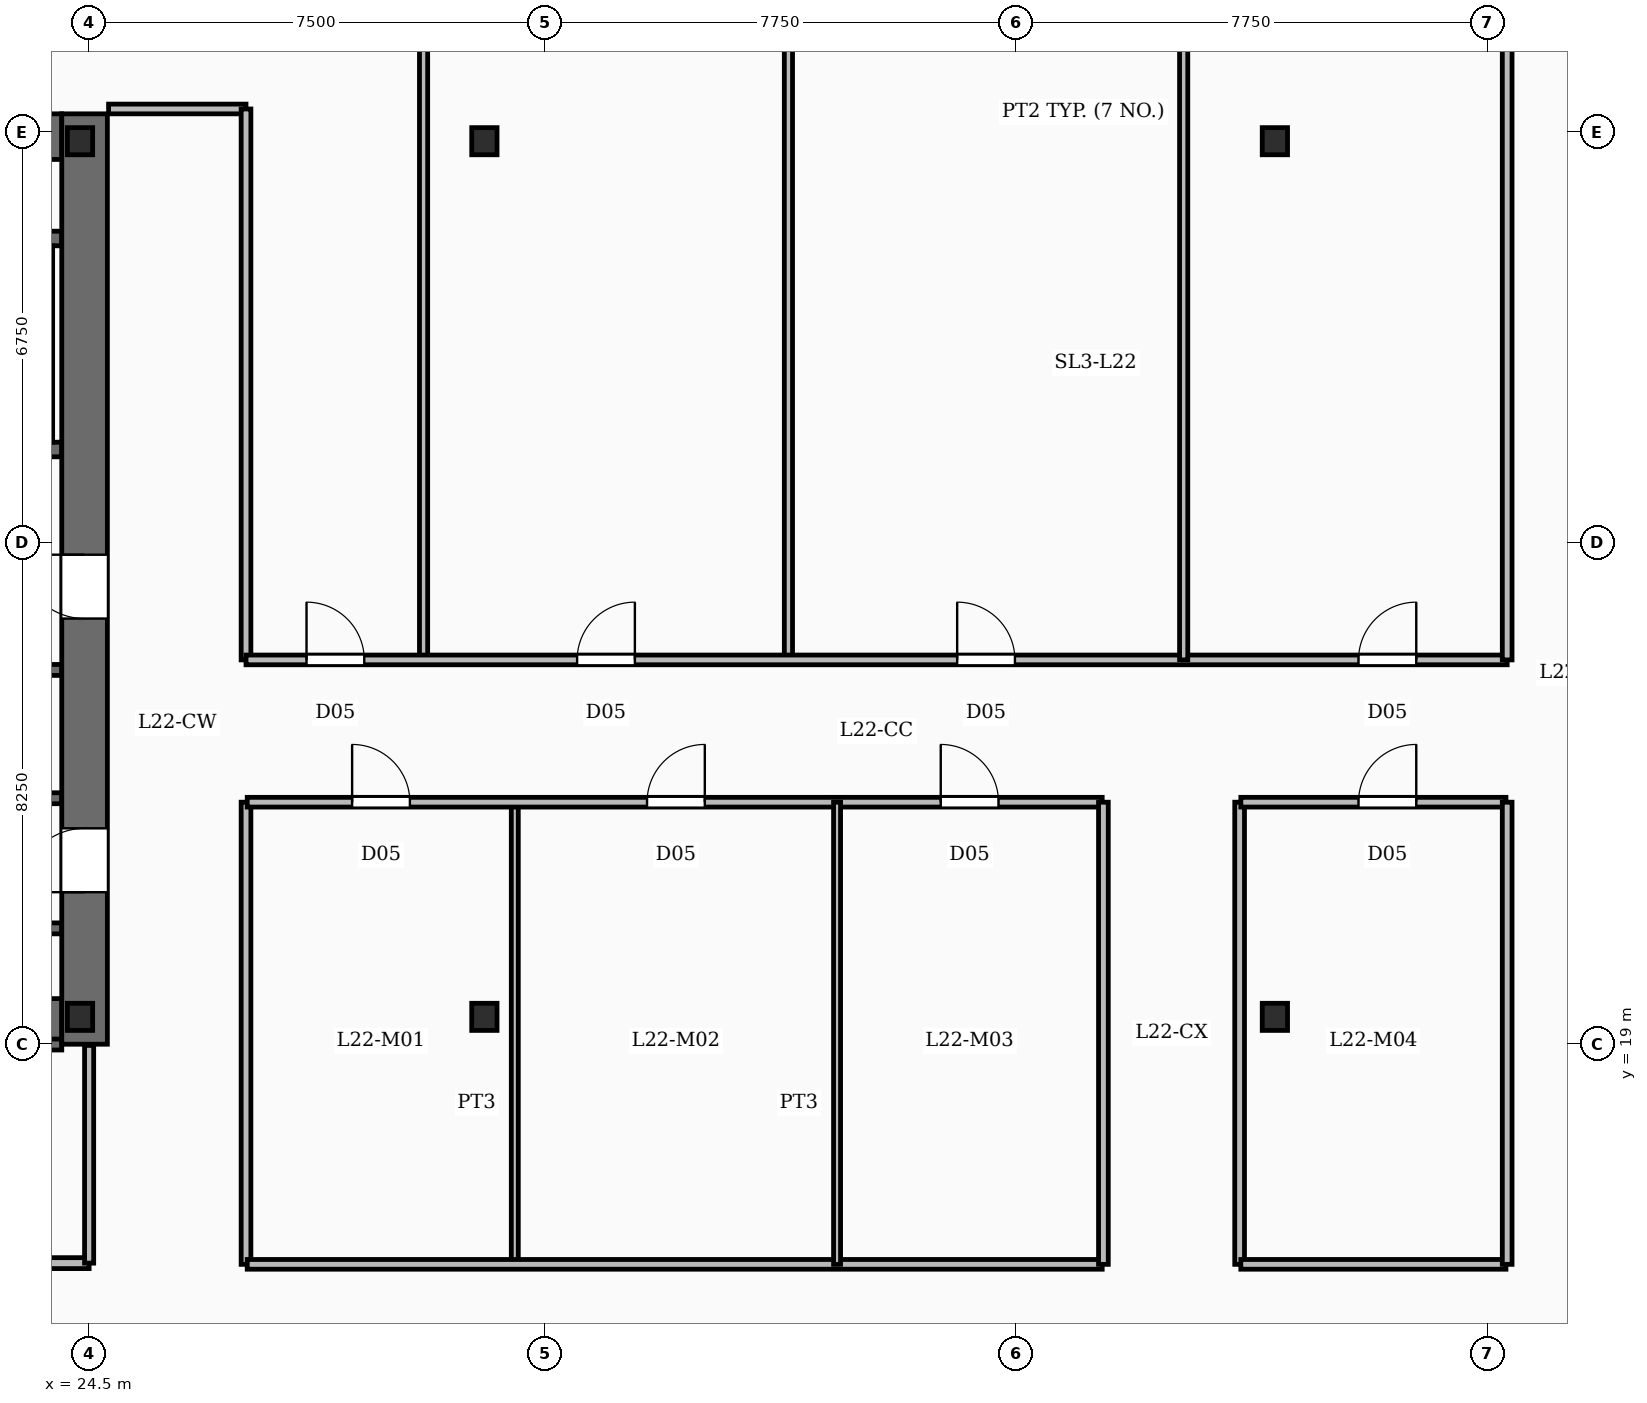
"""IFC4 building model, lengths in metres.
Left out: names, types, materials, properties, quantities, classifications, styles, units other than length and angle.
Written with IfcOpenShell. Run it as: python <this file> out.ifc"""

import sys

from ifc_helpers import new_model, si_unit, direction, frame, frame_2d, origin, origin_2d, place, context, subcontext, project, spatial, rectangle, i_section, extrude, element, fill, save


model = new_model("IFC4")
c1 = context("Model", 3, precision=1e-05, world=origin(), true_north=direction((0.0, 1.0)))
c2 = subcontext(c1, "Body", "Model", "MODEL_VIEW")
j1 = project(units=[si_unit("LENGTHUNIT", "METRE"), si_unit("PLANEANGLEUNIT", "RADIAN")], contexts=[c1])
p1 = place(None, origin())
s1 = spatial("IfcSite", under=j1, at=p1, CompositionType="ELEMENT")
p2 = place(p1, origin())
s2 = spatial("IfcBuilding", under=s1, at=p2, CompositionType="ELEMENT")
p3 = place(p2, frame((0.0, 0.0, 99.7)))
s3 = spatial("IfcBuildingStorey", under=s2, at=p3, CompositionType="ELEMENT", Elevation=99.7)
p4 = place(p3, frame((24.425, 19.0, -0.45), z_axis=(0.0, 0.0, 1.0), x_axis=(0.0, 1.0, 0.0)))
e1 = element("IfcWall", 1, at=p4, inside=s3, PredefinedType="SHEAR", context=c2, shape_type="SweptSolid", body=[
    extrude(rectangle(XDim=15.3, YDim=0.75, at=frame_2d((7.65, 0.0))), origin(), (0.0, 0.0, 1.0), 3.93),
])
p5 = place(p4, frame((2.5, 0.0, 0.45)))
e2 = element("IfcOpeningElement", 2, at=p5, cuts=e1, PredefinedType="OPENING", context=c2, shape_type="SweptSolid", body=[
    extrude(rectangle(XDim=1.05, YDim=2.15, at=frame_2d((0.525, 1.075))), frame((0.0, 0.385, 0.0), z_axis=(0.0, -1.0, 0.0), x_axis=(1.0, 0.0, 0.0)), (0.0, 0.0, 1.0), 0.77),
])
p6 = place(p4, frame((7.0, 0.0, 0.45)))
e3 = element("IfcOpeningElement", 3, at=p6, cuts=e1, PredefinedType="OPENING", context=c2, shape_type="SweptSolid", body=[
    extrude(rectangle(XDim=1.05, YDim=2.15, at=frame_2d((0.525, 1.075))), frame((0.0, 0.385, 0.0), z_axis=(0.0, -1.0, 0.0), x_axis=(1.0, 0.0, 0.0)), (0.0, 0.0, 1.0), 0.77),
])
for number, where, z_axis, x_axis in (
    (4, (14.85, 19.375, -0.45), (0.0, 0.0, 1.0), (1.0, 0.0, 0.0)),
    (5, (14.85, 33.925, -0.45), (0.0, 0.0, 1.0), (1.0, 0.0, 0.0)),
):
    element("IfcWall", number, at=place(p3, frame(where, z_axis=z_axis, x_axis=x_axis)), inside=s3, PredefinedType="SHEAR", context=c2, shape_type="SweptSolid", body=[
        extrude(rectangle(XDim=9.2, YDim=0.75, at=frame_2d((4.6, 0.0))), origin(), (0.0, 0.0, 1.0), 3.93),
    ])
for number, where, z_axis, x_axis in (
    (6, (24.35, 19.45, -0.45), (0.0, 0.0, 1.0), (1.0, 0.0, 0.0)),
    (7, (24.35, 33.85, -0.45), (0.0, 0.0, 1.0), (1.0, 0.0, 0.0)),
    (8, (31.0, 19.45, -0.45), (0.0, 0.0, 1.0), (1.0, 0.0, 0.0)),
    (9, (44.0, 19.45, -0.45), (0.0, 0.0, 1.0), (1.0, 0.0, 0.0)),
    (10, (31.0, 33.85, -0.45), (0.0, 0.0, 1.0), (1.0, 0.0, 0.0)),
    (11, (44.0, 33.85, -0.45), (0.0, 0.0, 1.0), (1.0, 0.0, 0.0)),
):
    element("IfcColumn", number, at=place(p3, frame(where, z_axis=z_axis, x_axis=x_axis)), inside=s3, PredefinedType="COLUMN", context=c2, shape_type="SweptSolid", body=[
        extrude(i_section(OverallWidth=0.416, OverallDepth=0.446, WebThickness=0.039, FlangeThickness=0.063, FilletRadius=0.02, at=origin_2d()), origin(), (0.0, 0.0, 1.0), 3.93),
    ])
p7 = place(p3, frame((24.05, 28.78, 0.0), z_axis=(0.0, 0.0, 1.0), x_axis=(-1.0, 0.0, 0.0)))
e12 = element("IfcWall", 12, at=p7, inside=s3, PredefinedType="SOLIDWALL", context=c2, shape_type="SweptSolid", body=[
    extrude(rectangle(XDim=9.2, YDim=0.24, at=frame_2d((4.6, 0.0))), origin(), (0.0, 0.0, 1.0), 3.48),
])
p8 = place(p7, frame((7.53, 0.0, 0.0)))
e13 = element("IfcOpeningElement", 13, at=p8, cuts=e12, PredefinedType="OPENING", context=c2, shape_type="SweptSolid", body=[
    extrude(rectangle(XDim=1.1, YDim=2.15, at=frame_2d((0.55, 1.075))), frame((0.0, 0.13, 0.0), z_axis=(0.0, -1.0, 0.0), x_axis=(1.0, 0.0, 0.0)), (0.0, 0.0, 1.0), 0.26),
])
p9 = place(p3, frame((14.85, 32.25, 0.0), z_axis=(0.0, 0.0, 1.0), x_axis=(1.0, 0.0, 0.0)))
e14 = element("IfcWall", 14, at=p9, inside=s3, PredefinedType="SOLIDWALL", context=c2, shape_type="SweptSolid", body=[
    extrude(rectangle(XDim=9.2, YDim=0.24, at=frame_2d((4.6, 0.0))), origin(), (0.0, 0.0, 1.0), 3.48),
])
p10 = place(p3, frame((23.78, 28.9, 0.0), z_axis=(0.0, 0.0, 1.0), x_axis=(0.0, 1.0, 0.0)))
e15 = element("IfcWall", 15, at=p10, inside=s3, PredefinedType="SOLIDWALL", context=c2, shape_type="SweptSolid", body=[
    extrude(rectangle(XDim=3.23, YDim=0.24, at=frame_2d((1.615, 0.0))), origin(), (0.0, 0.0, 1.0), 3.48),
])
for number, where, z_axis, x_axis in (
    (16, (20.9, 20.905, 0.0), (0.0, 0.0, 1.0), (1.0, 0.0, 0.0)),
    (17, (20.9, 18.995, 0.0), (0.0, 0.0, 1.0), (1.0, 0.0, 0.0)),
):
    element("IfcWall", number, at=place(p3, frame(where, z_axis=z_axis, x_axis=x_axis)), inside=s3, PredefinedType="SOLIDWALL", context=c2, shape_type="SweptSolid", body=[
        extrude(rectangle(XDim=3.15, YDim=0.18, at=frame_2d((1.575, 0.0))), origin(), (0.0, 0.0, 1.0), 3.48),
    ])
for number, where, z_axis, x_axis in (
    (18, (20.95, 25.155, 0.0), (0.0, 0.0, 1.0), (1.0, 0.0, 0.0)),
    (19, (20.95, 23.045, 0.0), (0.0, 0.0, 1.0), (1.0, 0.0, 0.0)),
):
    element("IfcWall", number, at=place(p3, frame(where, z_axis=z_axis, x_axis=x_axis)), inside=s3, PredefinedType="SOLIDWALL", context=c2, shape_type="SweptSolid", body=[
        extrude(rectangle(XDim=3.1, YDim=0.18, at=frame_2d((1.55, 0.0))), origin(), (0.0, 0.0, 1.0), 3.48),
    ])
p11 = place(p3, frame((14.6, 15.4, 0.0), z_axis=(0.0, 0.0, 1.0), x_axis=(1.0, 0.0, 0.0)))
e20 = element("IfcWall", 20, at=p11, inside=s3, PredefinedType="PARTITIONING", context=c2, shape_type="SweptSolid", body=[
    extrude(rectangle(XDim=9.9, YDim=0.18, at=frame_2d((4.95, 0.0))), origin(), (0.0, 0.0, 1.0), 2.54),
])
p12 = place(p11, frame((1.99, 0.0, 0.0)))
e21 = element("IfcOpeningElement", 21, at=p12, cuts=e20, PredefinedType="OPENING", context=c2, shape_type="SweptSolid", body=[
    extrude(rectangle(XDim=0.92, YDim=2.1, at=frame_2d((0.46, 1.05))), frame((0.0, 0.1, 0.0), z_axis=(0.0, -1.0, 0.0), x_axis=(1.0, 0.0, 0.0)), (0.0, 0.0, 1.0), 0.2),
])
p13 = place(p11, frame((6.94, 0.0, 0.0)))
e22 = element("IfcOpeningElement", 22, at=p13, cuts=e20, PredefinedType="OPENING", context=c2, shape_type="SweptSolid", body=[
    extrude(rectangle(XDim=0.92, YDim=2.1, at=frame_2d((0.46, 1.05))), frame((0.0, 0.1, 0.0), z_axis=(0.0, -1.0, 0.0), x_axis=(1.0, 0.0, 0.0)), (0.0, 0.0, 1.0), 0.2),
])
p14 = place(p3, frame((24.5, 15.4, 0.0), z_axis=(0.0, 0.0, 1.0), x_axis=(0.0, 1.0, 0.0)))
e23 = element("IfcWall", 23, at=p14, inside=s3, PredefinedType="PARTITIONING", context=c2, shape_type="SweptSolid", body=[
    extrude(rectangle(XDim=3.58, YDim=0.15, at=frame_2d((1.79, 0.0))), origin(), (0.0, 0.0, 1.0), 2.54),
])
p15 = place(p3, frame((30.0, 25.32, 0.0), z_axis=(0.0, 0.0, 1.0), x_axis=(0.0, 1.0, 0.0)))
e24 = element("IfcWall", 24, at=p15, inside=s3, PredefinedType="PARTITIONING", context=c2, shape_type="SweptSolid", body=[
    extrude(rectangle(XDim=26.867, YDim=0.135, at=frame_2d((13.434, 0.0))), origin(), (0.0, 0.0, 1.0), 2.54),
])
p16 = place(p3, frame((36.0, 25.32, 0.0), z_axis=(0.0, 0.0, 1.0), x_axis=(0.0, 1.0, 0.0)))
e25 = element("IfcWall", 25, at=p16, inside=s3, PredefinedType="PARTITIONING", context=c2, shape_type="SweptSolid", body=[
    extrude(rectangle(XDim=27.498, YDim=0.135, at=frame_2d((13.749, 0.0))), origin(), (0.0, 0.0, 1.0), 2.54),
])
p17 = place(p3, frame((42.5, 25.32, 0.0), z_axis=(0.0, 0.0, 1.0), x_axis=(0.0, 1.0, 0.0)))
e26 = element("IfcWall", 26, at=p17, inside=s3, PredefinedType="PARTITIONING", context=c2, shape_type="SweptSolid", body=[
    extrude(rectangle(XDim=28.181, YDim=0.135, at=frame_2d((14.09, 0.0))), origin(), (0.0, 0.0, 1.0), 2.54),
])
p18 = place(p3, frame((27.08, 25.32, 0.0), z_axis=(0.0, 0.0, 1.0), x_axis=(1.0, 0.0, 0.0)))
e27 = element("IfcWall", 27, at=p18, inside=s3, PredefinedType="PARTITIONING", context=c2, shape_type="SweptSolid", body=[
    extrude(rectangle(XDim=20.74, YDim=0.16, at=frame_2d((10.37, 0.0))), origin(), (0.0, 0.0, 1.0), 2.54),
])
p19 = place(p18, frame((0.995, 0.0, 0.0)))
e28 = element("IfcOpeningElement", 28, at=p19, cuts=e27, PredefinedType="OPENING", context=c2, shape_type="SweptSolid", body=[
    extrude(rectangle(XDim=0.95, YDim=2.15, at=frame_2d((0.475, 1.075))), frame((0.0, 0.09, 0.0), z_axis=(0.0, -1.0, 0.0), x_axis=(1.0, 0.0, 0.0)), (0.0, 0.0, 1.0), 0.18),
])
p20 = place(p18, frame((5.445, 0.0, 0.0)))
e29 = element("IfcOpeningElement", 29, at=p20, cuts=e27, PredefinedType="OPENING", context=c2, shape_type="SweptSolid", body=[
    extrude(rectangle(XDim=0.95, YDim=2.15, at=frame_2d((0.475, 1.075))), frame((0.0, 0.09, 0.0), z_axis=(0.0, -1.0, 0.0), x_axis=(1.0, 0.0, 0.0)), (0.0, 0.0, 1.0), 0.18),
])
p21 = place(p18, frame((11.695, 0.0, 0.0)))
e30 = element("IfcOpeningElement", 30, at=p21, cuts=e27, PredefinedType="OPENING", context=c2, shape_type="SweptSolid", body=[
    extrude(rectangle(XDim=0.95, YDim=2.15, at=frame_2d((0.475, 1.075))), frame((0.0, 0.09, 0.0), z_axis=(0.0, -1.0, 0.0), x_axis=(1.0, 0.0, 0.0)), (0.0, 0.0, 1.0), 0.18),
])
p22 = place(p18, frame((18.295, 0.0, 0.0)))
e31 = element("IfcOpeningElement", 31, at=p22, cuts=e27, PredefinedType="OPENING", context=c2, shape_type="SweptSolid", body=[
    extrude(rectangle(XDim=0.95, YDim=2.15, at=frame_2d((0.475, 1.075))), frame((0.0, 0.09, 0.0), z_axis=(0.0, -1.0, 0.0), x_axis=(1.0, 0.0, 0.0)), (0.0, 0.0, 1.0), 0.18),
])
p23 = place(p3, frame((27.08, 25.32, 0.0), z_axis=(0.0, 0.0, 1.0), x_axis=(0.0, 1.0, 0.0)))
e32 = element("IfcWall", 32, at=p23, inside=s3, PredefinedType="PARTITIONING", context=c2, shape_type="SweptSolid", body=[
    extrude(rectangle(XDim=9.06, YDim=0.16, at=frame_2d((4.53, 0.0))), origin(), (0.0, 0.0, 1.0), 2.54),
])
p24 = place(p3, frame((24.82, 34.38, 0.0), z_axis=(0.0, 0.0, 1.0), x_axis=(1.0, 0.0, 0.0)))
e33 = element("IfcWall", 33, at=p24, inside=s3, PredefinedType="PARTITIONING", context=c2, shape_type="SweptSolid", body=[
    extrude(rectangle(XDim=2.26, YDim=0.16, at=frame_2d((1.13, 0.0))), origin(), (0.0, 0.0, 1.0), 2.54),
])
for number, where, z_axis, x_axis in (
    (34, (31.5, 15.38, 0.0), (0.0, 0.0, 1.0), (0.0, 1.0, 0.0)),
    (35, (36.8, 15.38, 0.0), (0.0, 0.0, 1.0), (0.0, 1.0, 0.0)),
):
    element("IfcWall", number, at=place(p3, frame(where, z_axis=z_axis, x_axis=x_axis)), inside=s3, PredefinedType="PARTITIONING", context=c2, shape_type="SweptSolid", body=[
        extrude(rectangle(XDim=7.6, YDim=0.115, at=frame_2d((3.8, 0.0))), origin(), (0.0, 0.0, 1.0), 2.54),
    ])
p25 = place(p3, frame((27.1, 22.98, 0.0), z_axis=(0.0, 0.0, 1.0), x_axis=(1.0, 0.0, 0.0)))
e36 = element("IfcWall", 36, at=p25, inside=s3, PredefinedType="PARTITIONING", context=c2, shape_type="SweptSolid", body=[
    extrude(rectangle(XDim=14.06, YDim=0.16, at=frame_2d((7.03, 0.0))), origin(), (0.0, 0.0, 1.0), 2.54),
])
p26 = place(p25, frame((1.725, 0.0, 0.0)))
e37 = element("IfcOpeningElement", 37, at=p26, cuts=e36, PredefinedType="OPENING", context=c2, shape_type="SweptSolid", body=[
    extrude(rectangle(XDim=0.95, YDim=2.15, at=frame_2d((0.475, 1.075))), frame((0.0, 0.09, 0.0), z_axis=(0.0, -1.0, 0.0), x_axis=(1.0, 0.0, 0.0)), (0.0, 0.0, 1.0), 0.18),
])
p27 = place(p25, frame((6.575, 0.0, 0.0)))
e38 = element("IfcOpeningElement", 38, at=p27, cuts=e36, PredefinedType="OPENING", context=c2, shape_type="SweptSolid", body=[
    extrude(rectangle(XDim=0.95, YDim=2.15, at=frame_2d((0.475, 1.075))), frame((0.0, 0.09, 0.0), z_axis=(0.0, -1.0, 0.0), x_axis=(1.0, 0.0, 0.0)), (0.0, 0.0, 1.0), 0.18),
])
p28 = place(p25, frame((11.405, 0.0, 0.0)))
e39 = element("IfcOpeningElement", 39, at=p28, cuts=e36, PredefinedType="OPENING", context=c2, shape_type="SweptSolid", body=[
    extrude(rectangle(XDim=0.95, YDim=2.15, at=frame_2d((0.475, 1.075))), frame((0.0, 0.09, 0.0), z_axis=(0.0, -1.0, 0.0), x_axis=(1.0, 0.0, 0.0)), (0.0, 0.0, 1.0), 0.18),
])
p29 = place(p3, frame((27.1, 15.38, 0.0), z_axis=(0.0, 0.0, 1.0), x_axis=(1.0, 0.0, 0.0)))
e40 = element("IfcWall", 40, at=p29, inside=s3, PredefinedType="PARTITIONING", context=c2, shape_type="SweptSolid", body=[
    extrude(rectangle(XDim=14.06, YDim=0.16, at=frame_2d((7.03, 0.0))), origin(), (0.0, 0.0, 1.0), 2.54),
])
p30 = place(p3, frame((43.44, 22.98, 0.0), z_axis=(0.0, 0.0, 1.0), x_axis=(1.0, 0.0, 0.0)))
e41 = element("IfcWall", 41, at=p30, inside=s3, PredefinedType="PARTITIONING", context=c2, shape_type="SweptSolid", body=[
    extrude(rectangle(XDim=4.36, YDim=0.16, at=frame_2d((2.18, 0.0))), origin(), (0.0, 0.0, 1.0), 2.54),
])
p31 = place(p30, frame((1.935, 0.0, 0.0)))
e42 = element("IfcOpeningElement", 42, at=p31, cuts=e41, PredefinedType="OPENING", context=c2, shape_type="SweptSolid", body=[
    extrude(rectangle(XDim=0.95, YDim=2.15, at=frame_2d((0.475, 1.075))), frame((0.0, 0.09, 0.0), z_axis=(0.0, -1.0, 0.0), x_axis=(1.0, 0.0, 0.0)), (0.0, 0.0, 1.0), 0.18),
])
p32 = place(p3, frame((43.44, 15.38, 0.0), z_axis=(0.0, 0.0, 1.0), x_axis=(1.0, 0.0, 0.0)))
e43 = element("IfcWall", 43, at=p32, inside=s3, PredefinedType="PARTITIONING", context=c2, shape_type="SweptSolid", body=[
    extrude(rectangle(XDim=4.36, YDim=0.16, at=frame_2d((2.18, 0.0))), origin(), (0.0, 0.0, 1.0), 2.54),
])
for number, where, z_axis, x_axis in (
    (44, (41.18, 15.38, 0.0), (0.0, 0.0, 1.0), (0.0, 1.0, 0.0)),
    (45, (43.42, 15.38, 0.0), (0.0, 0.0, 1.0), (0.0, 1.0, 0.0)),
    (46, (27.08, 15.38, 0.0), (0.0, 0.0, 1.0), (0.0, 1.0, 0.0)),
    (47, (47.82, 15.38, 0.0), (0.0, 0.0, 1.0), (0.0, 1.0, 0.0)),
):
    element("IfcWall", number, at=place(p3, frame(where, z_axis=z_axis, x_axis=x_axis)), inside=s3, PredefinedType="PARTITIONING", context=c2, shape_type="SweptSolid", body=[
        extrude(rectangle(XDim=7.6, YDim=0.16, at=frame_2d((3.8, 0.0))), origin(), (0.0, 0.0, 1.0), 2.54),
    ])
p33 = place(p3, frame((47.82, 25.32, 0.0), z_axis=(0.0, 0.0, 1.0), x_axis=(0.0, 1.0, 0.0)))
e48 = element("IfcWall", 48, at=p33, inside=s3, PredefinedType="PARTITIONING", context=c2, shape_type="SweptSolid", body=[
    extrude(rectangle(XDim=10.88, YDim=0.16, at=frame_2d((5.44, 0.0))), origin(), (0.0, 0.0, 1.0), 2.54),
])
p34 = place(p5, origin())
e49 = element("IfcDoor", 49, at=p34, inside=s3, OperationType="SINGLE_SWING_LEFT", PredefinedType="DOOR", context=c2, shape_type="SweptSolid", body=[
    extrude(rectangle(XDim=1.05, YDim=2.15, at=frame_2d((0.525, 1.075))), frame((0.0, 0.025, 0.0), z_axis=(0.0, -1.0, 0.0), x_axis=(1.0, 0.0, 0.0)), (0.0, 0.0, 1.0), 0.05),
])
fill(e2, e49)
p35 = place(p6, origin())
e50 = element("IfcDoor", 50, at=p35, inside=s3, OperationType="SINGLE_SWING_RIGHT", PredefinedType="DOOR", context=c2, shape_type="SweptSolid", body=[
    extrude(rectangle(XDim=1.05, YDim=2.15, at=frame_2d((0.525, 1.075))), frame((0.0, 0.025, 0.0), z_axis=(0.0, -1.0, 0.0), x_axis=(1.0, 0.0, 0.0)), (0.0, 0.0, 1.0), 0.05),
])
fill(e3, e50)
p36 = place(p19, origin())
e51 = element("IfcDoor", 51, at=p36, inside=s3, OperationType="SINGLE_SWING_LEFT", PredefinedType="DOOR", context=c2, shape_type="SweptSolid", body=[
    extrude(rectangle(XDim=0.95, YDim=2.15, at=frame_2d((0.475, 1.075))), frame((0.0, 0.025, 0.0), z_axis=(0.0, -1.0, 0.0), x_axis=(1.0, 0.0, 0.0)), (0.0, 0.0, 1.0), 0.05),
])
fill(e28, e51)
p37 = place(p20, origin())
e52 = element("IfcDoor", 52, at=p37, inside=s3, OperationType="SINGLE_SWING_RIGHT", PredefinedType="DOOR", context=c2, shape_type="SweptSolid", body=[
    extrude(rectangle(XDim=0.95, YDim=2.15, at=frame_2d((0.475, 1.075))), frame((0.0, 0.025, 0.0), z_axis=(0.0, -1.0, 0.0), x_axis=(1.0, 0.0, 0.0)), (0.0, 0.0, 1.0), 0.05),
])
fill(e29, e52)
p38 = place(p21, origin())
e53 = element("IfcDoor", 53, at=p38, inside=s3, OperationType="SINGLE_SWING_LEFT", PredefinedType="DOOR", context=c2, shape_type="SweptSolid", body=[
    extrude(rectangle(XDim=0.95, YDim=2.15, at=frame_2d((0.475, 1.075))), frame((0.0, 0.025, 0.0), z_axis=(0.0, -1.0, 0.0), x_axis=(1.0, 0.0, 0.0)), (0.0, 0.0, 1.0), 0.05),
])
fill(e30, e53)
p39 = place(p22, origin())
e54 = element("IfcDoor", 54, at=p39, inside=s3, OperationType="SINGLE_SWING_RIGHT", PredefinedType="DOOR", context=c2, shape_type="SweptSolid", body=[
    extrude(rectangle(XDim=0.95, YDim=2.15, at=frame_2d((0.475, 1.075))), frame((0.0, 0.025, 0.0), z_axis=(0.0, -1.0, 0.0), x_axis=(1.0, 0.0, 0.0)), (0.0, 0.0, 1.0), 0.05),
])
fill(e31, e54)
p40 = place(p26, origin())
e55 = element("IfcDoor", 55, at=p40, inside=s3, OperationType="SINGLE_SWING_LEFT", PredefinedType="DOOR", context=c2, shape_type="SweptSolid", body=[
    extrude(rectangle(XDim=0.95, YDim=2.15, at=frame_2d((0.475, 1.075))), frame((0.0, 0.025, 0.0), z_axis=(0.0, -1.0, 0.0), x_axis=(1.0, 0.0, 0.0)), (0.0, 0.0, 1.0), 0.05),
])
fill(e37, e55)
p41 = place(p27, origin())
e56 = element("IfcDoor", 56, at=p41, inside=s3, OperationType="SINGLE_SWING_RIGHT", PredefinedType="DOOR", context=c2, shape_type="SweptSolid", body=[
    extrude(rectangle(XDim=0.95, YDim=2.15, at=frame_2d((0.475, 1.075))), frame((0.0, 0.025, 0.0), z_axis=(0.0, -1.0, 0.0), x_axis=(1.0, 0.0, 0.0)), (0.0, 0.0, 1.0), 0.05),
])
fill(e38, e56)
p42 = place(p28, origin())
e57 = element("IfcDoor", 57, at=p42, inside=s3, OperationType="SINGLE_SWING_LEFT", PredefinedType="DOOR", context=c2, shape_type="SweptSolid", body=[
    extrude(rectangle(XDim=0.95, YDim=2.15, at=frame_2d((0.475, 1.075))), frame((0.0, 0.025, 0.0), z_axis=(0.0, -1.0, 0.0), x_axis=(1.0, 0.0, 0.0)), (0.0, 0.0, 1.0), 0.05),
])
fill(e39, e57)
p43 = place(p31, origin())
e58 = element("IfcDoor", 58, at=p43, inside=s3, OperationType="SINGLE_SWING_RIGHT", PredefinedType="DOOR", context=c2, shape_type="SweptSolid", body=[
    extrude(rectangle(XDim=0.95, YDim=2.15, at=frame_2d((0.475, 1.075))), frame((0.0, 0.025, 0.0), z_axis=(0.0, -1.0, 0.0), x_axis=(1.0, 0.0, 0.0)), (0.0, 0.0, 1.0), 0.05),
])
fill(e42, e58)
save(model, sys.argv[1])
